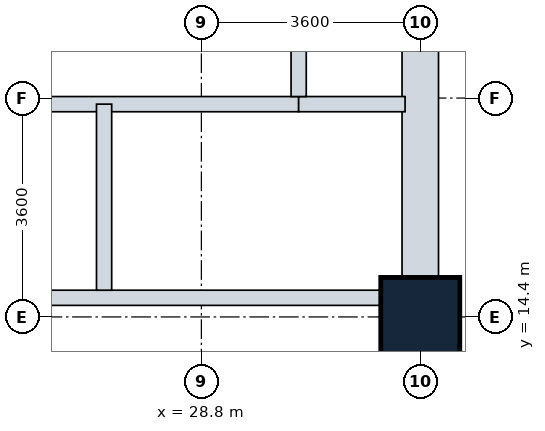
"""IFC4 building model, lengths in metres.
Left out: names, types, materials, properties, quantities, classifications, styles, units other than length and angle.
Written with IfcOpenShell. Run it as: python <this file> out.ifc"""

import sys

from ifc_helpers import new_model, si_unit, direction, frame, frame_2d, origin, origin_2d, place, context, subcontext, project, spatial, rectangle, extrude, element, fill, save


model = new_model("IFC4")
c1 = context("Model", 3, precision=1e-05, world=origin(), true_north=direction((0.0, 1.0)))
c2 = subcontext(c1, "Body", "Model", "MODEL_VIEW")
j1 = project(units=[si_unit("LENGTHUNIT", "METRE"), si_unit("PLANEANGLEUNIT", "RADIAN")], contexts=[c1])
p1 = place(None, origin())
s1 = spatial("IfcSite", under=j1, at=p1, CompositionType="ELEMENT")
p2 = place(p1, origin())
s2 = spatial("IfcBuilding", under=s1, at=p2, CompositionType="ELEMENT")
p3 = place(p2, origin())
s3 = spatial("IfcBuildingStorey", under=s2, at=p3, CompositionType="ELEMENT", Elevation=0.0)
p4 = place(p3, frame((32.4, 14.4, 0.0), z_axis=(0.0, 0.0, 1.0), x_axis=(1.0, 0.0, 0.0)))
e1 = element("IfcColumn", 1, at=p4, inside=s3, PredefinedType="COLUMN", context=c2, shape_type="SweptSolid", body=[
    extrude(rectangle(XDim=1.3, YDim=1.3, at=origin_2d()), origin(), (0.0, 0.0, 1.0), 5.4),
])
p5 = place(p3, frame((32.4, 10.8, 0.0), z_axis=(0.0, 0.0, 1.0), x_axis=(0.0, 1.0, 0.0)))
e2 = element("IfcWall", 2, at=p5, inside=s3, PredefinedType="SHEAR", context=c2, shape_type="SweptSolid", body=[
    extrude(rectangle(XDim=14.4, YDim=0.6, at=frame_2d((7.2, 0.0))), origin(), (0.0, 0.0, 1.0), 5.1),
])
p6 = place(p5, frame((4.35, 0.0, 0.0)))
e3 = element("IfcOpeningElement", 3, at=p6, cuts=e2, PredefinedType="OPENING", context=c2, shape_type="SweptSolid", body=[
    extrude(rectangle(XDim=1.2, YDim=2.1, at=frame_2d((0.6, 1.05))), frame((0.0, 0.31, 0.0), z_axis=(0.0, -1.0, 0.0), x_axis=(1.0, 0.0, 0.0)), (0.0, 0.0, 1.0), 0.62),
])
p7 = place(p5, frame((10.0, 0.0, 0.0)))
e4 = element("IfcOpeningElement", 4, at=p7, cuts=e2, PredefinedType="OPENING", context=c2, shape_type="SweptSolid", body=[
    extrude(rectangle(XDim=1.2, YDim=2.1, at=frame_2d((0.6, 1.05))), frame((0.0, 0.31, 0.0), z_axis=(0.0, -1.0, 0.0), x_axis=(1.0, 0.0, 0.0)), (0.0, 0.0, 1.0), 0.62),
])
p8 = place(p3, frame((23.35, 14.715, 0.0), z_axis=(0.0, 0.0, 1.0), x_axis=(1.0, 0.0, 0.0)))
e5 = element("IfcWall", 5, at=p8, inside=s3, PredefinedType="SHEAR", context=c2, shape_type="SweptSolid", body=[
    extrude(rectangle(XDim=8.75, YDim=0.25, at=frame_2d((4.375, 0.0))), origin(), (0.0, 0.0, 1.0), 5.1),
])
p9 = place(p8, frame((6.775, 0.0, 0.0)))
e6 = element("IfcOpeningElement", 6, at=p9, cuts=e5, PredefinedType="OPENING", context=c2, shape_type="SweptSolid", body=[
    extrude(rectangle(XDim=1.1, YDim=2.1, at=frame_2d((0.55, 1.05))), frame((0.0, 0.135, 0.0), z_axis=(0.0, -1.0, 0.0), x_axis=(1.0, 0.0, 0.0)), (0.0, 0.0, 1.0), 0.27),
])
p10 = place(p3, frame((21.88, 17.9, 0.0), z_axis=(0.0, 0.0, 1.0), x_axis=(1.0, 0.0, 0.0)))
e7 = element("IfcWall", 7, at=p10, inside=s3, PredefinedType="PARTITIONING", context=c2, shape_type="SweptSolid", body=[
    extrude(rectangle(XDim=8.52, YDim=0.25, at=frame_2d((4.26, 0.0))), origin(), (0.0, 0.0, 1.0), 5.085),
])
p11 = place(p3, frame((30.4, 17.9, 0.0), z_axis=(0.0, 0.0, 1.0), x_axis=(1.0, 0.0, 0.0)))
e8 = element("IfcWall", 8, at=p11, inside=s3, PredefinedType="PARTITIONING", context=c2, shape_type="SweptSolid", body=[
    extrude(rectangle(XDim=1.75, YDim=0.25, at=frame_2d((0.875, 0.0))), origin(), (0.0, 0.0, 1.0), 5.085),
])
p12 = place(p11, frame((0.32, 0.0, 0.0)))
e9 = element("IfcOpeningElement", 9, at=p12, cuts=e8, PredefinedType="OPENING", context=c2, shape_type="SweptSolid", body=[
    extrude(rectangle(XDim=1.1, YDim=2.1, at=frame_2d((0.55, 1.05))), frame((0.0, 0.135, 0.0), z_axis=(0.0, -1.0, 0.0), x_axis=(1.0, 0.0, 0.0)), (0.0, 0.0, 1.0), 0.27),
])
p13 = place(p3, frame((27.2, 14.84, 0.0), z_axis=(0.0, 0.0, 1.0), x_axis=(0.0, 1.0, 0.0)))
e10 = element("IfcWall", 10, at=p13, inside=s3, PredefinedType="PARTITIONING", context=c2, shape_type="SweptSolid", body=[
    extrude(rectangle(XDim=3.06, YDim=0.25, at=frame_2d((1.53, 0.0))), origin(), (0.0, 0.0, 1.0), 5.085),
])
p14 = place(p13, frame((0.98, 0.0, 0.0)))
e11 = element("IfcOpeningElement", 11, at=p14, cuts=e10, PredefinedType="OPENING", context=c2, shape_type="SweptSolid", body=[
    extrude(rectangle(XDim=1.1, YDim=2.1, at=frame_2d((0.55, 1.05))), frame((0.0, 0.135, 0.0), z_axis=(0.0, -1.0, 0.0), x_axis=(1.0, 0.0, 0.0)), (0.0, 0.0, 1.0), 0.27),
])
p15 = place(p3, frame((30.4, 18.025, 0.0), z_axis=(0.0, 0.0, 1.0), x_axis=(0.0, 1.0, 0.0)))
e12 = element("IfcWall", 12, at=p15, inside=s3, PredefinedType="PARTITIONING", context=c2, shape_type="SweptSolid", body=[
    extrude(rectangle(XDim=2.27, YDim=0.25, at=frame_2d((1.135, 0.0))), origin(), (0.0, 0.0, 1.0), 5.085),
])
p16 = place(p9, origin())
e13 = element("IfcDoor", 13, at=p16, inside=s3, OperationType="SINGLE_SWING_LEFT", PredefinedType="DOOR", context=c2, shape_type="SweptSolid", body=[
    extrude(rectangle(XDim=1.1, YDim=2.1, at=frame_2d((0.55, 1.05))), frame((0.0, 0.025, 0.0), z_axis=(0.0, -1.0, 0.0), x_axis=(1.0, 0.0, 0.0)), (0.0, 0.0, 1.0), 0.05),
])
fill(e6, e13)
p17 = place(p14, origin())
e14 = element("IfcDoor", 14, at=p17, inside=s3, OperationType="SLIDING_TO_LEFT", PredefinedType="DOOR", context=c2, shape_type="SweptSolid", body=[
    extrude(rectangle(XDim=1.1, YDim=2.1, at=frame_2d((0.55, 1.05))), frame((0.0, 0.025, 0.0), z_axis=(0.0, -1.0, 0.0), x_axis=(1.0, 0.0, 0.0)), (0.0, 0.0, 1.0), 0.05),
])
fill(e11, e14)
p18 = place(p6, origin())
e15 = element("IfcDoor", 15, at=p18, inside=s3, OperationType="SINGLE_SWING_LEFT", PredefinedType="DOOR", context=c2, shape_type="SweptSolid", body=[
    extrude(rectangle(XDim=1.2, YDim=2.1, at=frame_2d((0.6, 1.05))), frame((0.0, 0.025, 0.0), z_axis=(0.0, -1.0, 0.0), x_axis=(1.0, 0.0, 0.0)), (0.0, 0.0, 1.0), 0.05),
])
fill(e3, e15)
p19 = place(p12, origin())
e16 = element("IfcDoor", 16, at=p19, inside=s3, OperationType="SINGLE_SWING_LEFT", PredefinedType="DOOR", context=c2, shape_type="SweptSolid", body=[
    extrude(rectangle(XDim=1.1, YDim=2.1, at=frame_2d((0.55, 1.05))), frame((0.0, 0.025, 0.0), z_axis=(0.0, -1.0, 0.0), x_axis=(1.0, 0.0, 0.0)), (0.0, 0.0, 1.0), 0.05),
])
fill(e9, e16)
save(model, sys.argv[1])
